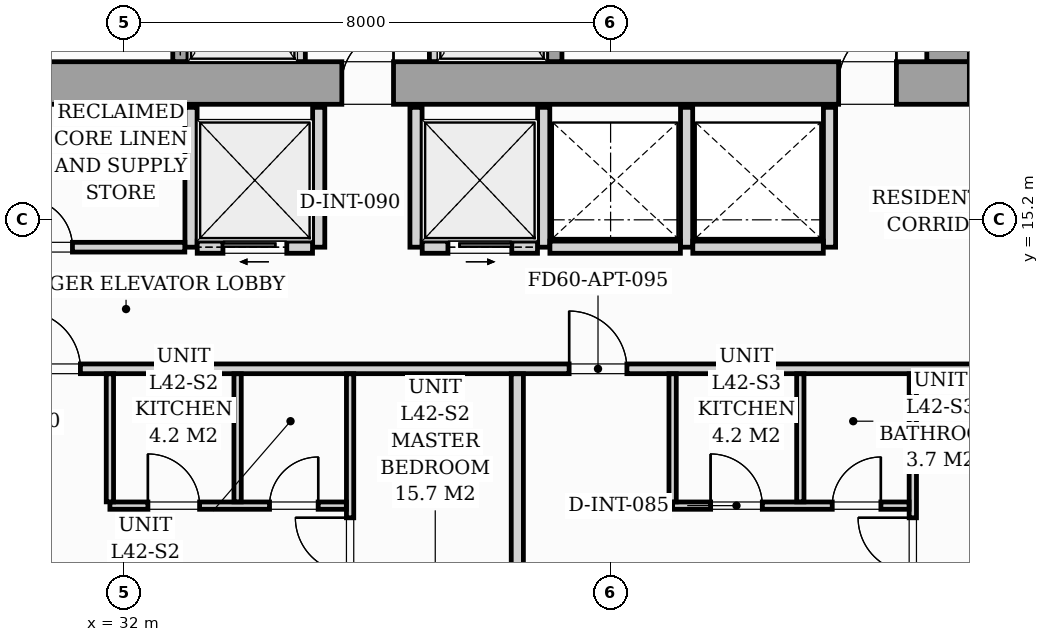
"""IFC4 building model, lengths in metres.
Left out: names, types, materials, properties, quantities, classifications, styles, units other than length and angle.
Written with IfcOpenShell. Run it as: python <this file> out.ifc"""

import sys

from ifc_helpers import new_model, si_unit, direction, frame, frame_2d, origin, origin_2d, place, context, subcontext, project, spatial, rectangle, i_section, extrude, source, transform, mapped, element, fill, save


model = new_model("IFC4")
c1 = context("Model", 3, precision=1e-05, world=origin(), true_north=direction((0.0, 1.0)))
c2 = subcontext(c1, "Body", "Model", "MODEL_VIEW")
j1 = project(units=[si_unit("LENGTHUNIT", "METRE"), si_unit("PLANEANGLEUNIT", "RADIAN")], contexts=[c1])
p1 = place(None, origin())
s1 = spatial("IfcSite", under=j1, at=p1, CompositionType="ELEMENT")
p2 = place(p1, origin())
s2 = spatial("IfcBuilding", under=s1, at=p2, CompositionType="ELEMENT")
p3 = place(p2, frame((0.0, 0.0, 147.0)))
s3 = spatial("IfcBuildingStorey", under=s2, at=p3, CompositionType="ELEMENT", Elevation=147.0)
m1 = source(origin(), c2, "Body", "SweptSolid", [
    extrude(i_section(OverallWidth=0.421, OverallDepth=0.465, WebThickness=0.045, FlangeThickness=0.073, FilletRadius=0.018, at=origin_2d()), origin(), (0.0, 0.0, 1.0), 3.196),
])
for number, where, z_axis, x_axis in (
    (1, (33.12, 17.4, 0.002), (0.0, 0.0, 1.0), (1.0, 0.0, 0.0)),
    (2, (38.88, 17.4, 0.002), (0.0, 0.0, 1.0), (1.0, 0.0, 0.0)),
    (3, (45.6, 17.4, 0.002), (0.0, 0.0, 1.0), (1.0, 0.0, 0.0)),
):
    element("IfcColumn", number, at=place(p3, frame(where, z_axis=z_axis, x_axis=x_axis)), inside=s3, PredefinedType="PILASTER", context=c2, shape_type="MappedRepresentation", body=[
        mapped(m1, transform((0.0, 0.0, 0.0), scale=1.0)),
    ])
p4 = place(p3, frame((26.1, 17.45, 0.0), z_axis=(0.0, 0.0, 1.0), x_axis=(1.0, 0.0, 0.0)))
e4 = element("IfcWall", 4, at=p4, inside=s3, PredefinedType="SHEAR", context=c2, shape_type="SweptSolid", body=[
    extrude(rectangle(XDim=19.8, YDim=0.7, at=frame_2d((9.9, 0.0))), origin(), (0.0, 0.0, 1.0), 3.2),
])
p5 = place(p4, frame((1.05, 0.0, 0.0)))
e5 = element("IfcOpeningElement", 5, at=p5, cuts=e4, PredefinedType="OPENING", context=c2, shape_type="SweptSolid", body=[
    extrude(rectangle(XDim=0.95, YDim=2.06, at=frame_2d((0.475, 1.03))), frame((0.0, 0.36, 0.0), z_axis=(0.0, -1.0, 0.0), x_axis=(1.0, 0.0, 0.0)), (0.0, 0.0, 1.0), 0.72),
])
p6 = place(p4, frame((9.48, 0.0, 0.0)))
e6 = element("IfcOpeningElement", 6, at=p6, cuts=e4, PredefinedType="OPENING", context=c2, shape_type="SweptSolid", body=[
    extrude(rectangle(XDim=0.85, YDim=2.0, at=frame_2d((0.425, 1.0))), frame((0.0, 0.36, 0.0), z_axis=(0.0, -1.0, 0.0), x_axis=(1.0, 0.0, 0.0)), (0.0, 0.0, 1.0), 0.72),
])
p7 = place(p4, frame((17.65, 0.0, 0.0)))
e7 = element("IfcOpeningElement", 7, at=p7, cuts=e4, PredefinedType="OPENING", context=c2, shape_type="SweptSolid", body=[
    extrude(rectangle(XDim=0.95, YDim=2.06, at=frame_2d((0.475, 1.03))), frame((0.0, 0.36, 0.0), z_axis=(0.0, -1.0, 0.0), x_axis=(1.0, 0.0, 0.0)), (0.0, 0.0, 1.0), 0.72),
])
p8 = place(p3, frame((45.55, 17.802, 0.0), z_axis=(0.0, 0.0, 1.0), x_axis=(0.0, 1.0, 0.0)))
e8 = element("IfcWall", 8, at=p8, inside=s3, PredefinedType="SHEAR", context=c2, shape_type="SweptSolid", body=[
    extrude(rectangle(XDim=5.796, YDim=0.7, at=frame_2d((2.898, 0.0))), origin(), (0.0, 0.0, 1.0), 3.2),
])
p9 = place(p3, frame((32.925, 17.802, 0.0), z_axis=(0.0, 0.0, 1.0), x_axis=(0.0, 1.0, 0.0)))
e9 = element("IfcWall", 9, at=p9, inside=s3, PredefinedType="SOLIDWALL", context=c2, shape_type="SweptSolid", body=[
    extrude(rectangle(XDim=2.646, YDim=0.25, at=frame_2d((1.323, 0.0))), origin(), (0.0, 0.0, 1.0), 3.2),
])
p10 = place(p9, frame((0.598, 0.0, 0.0)))
e10 = element("IfcOpeningElement", 10, at=p10, cuts=e9, PredefinedType="OPENING", context=c2, shape_type="SweptSolid", body=[
    extrude(rectangle(XDim=1.1, YDim=2.08, at=frame_2d((0.55, 1.04))), frame((0.0, 0.135, 0.0), z_axis=(0.0, -1.0, 0.0), x_axis=(1.0, 0.0, 0.0)), (0.0, 0.0, 1.0), 0.27),
])
for number, where, z_axis, x_axis in (
    (11, (34.9, 17.802, 0.0), (0.0, 0.0, 1.0), (0.0, 1.0, 0.0)),
    (12, (37.1, 17.802, 0.0), (0.0, 0.0, 1.0), (0.0, 1.0, 0.0)),
):
    element("IfcWall", number, at=place(p3, frame(where, z_axis=z_axis, x_axis=x_axis)), inside=s3, PredefinedType="PARTITIONING", context=c2, shape_type="SweptSolid", body=[
        extrude(rectangle(XDim=2.646, YDim=0.16, at=frame_2d((1.323, 0.0))), origin(), (0.0, 0.0, 1.0), 2.94),
    ])
p11 = place(p3, frame((39.075, 17.802, 0.0), z_axis=(0.0, 0.0, 1.0), x_axis=(0.0, 1.0, 0.0)))
e13 = element("IfcWall", 13, at=p11, inside=s3, PredefinedType="SOLIDWALL", context=c2, shape_type="SweptSolid", body=[
    extrude(rectangle(XDim=2.646, YDim=0.25, at=frame_2d((1.323, 0.0))), origin(), (0.0, 0.0, 1.0), 3.2),
])
p12 = place(p11, frame((0.598, 0.0, 0.0)))
e14 = element("IfcOpeningElement", 14, at=p12, cuts=e13, PredefinedType="OPENING", context=c2, shape_type="SweptSolid", body=[
    extrude(rectangle(XDim=1.1, YDim=2.08, at=frame_2d((0.55, 1.04))), frame((0.0, 0.135, 0.0), z_axis=(0.0, -1.0, 0.0), x_axis=(1.0, 0.0, 0.0)), (0.0, 0.0, 1.0), 0.27),
])
p13 = place(p3, frame((33.1, 14.75, 0.0), z_axis=(0.0, 0.0, 1.0), x_axis=(0.0, 1.0, 0.0)))
e15 = element("IfcWall", 15, at=p13, inside=s3, PredefinedType="PARTITIONING", context=c2, shape_type="SweptSolid", body=[
    extrude(rectangle(XDim=2.3, YDim=0.2, at=frame_2d((1.15, 0.0))), origin(), (0.0, 0.0, 1.0), 2.94),
])
p14 = place(p3, frame((28.482, 14.75, 0.0), z_axis=(0.0, 0.0, 1.0), x_axis=(1.0, 0.0, 0.0)))
e16 = element("IfcWall", 16, at=p14, inside=s3, PredefinedType="PARTITIONING", context=c2, shape_type="SweptSolid", body=[
    extrude(rectangle(XDim=4.516, YDim=0.16, at=frame_2d((2.258, 0.0))), origin(), (0.0, 0.0, 1.0), 2.94),
])
p15 = place(p14, frame((1.868, 0.0, 0.0)))
e17 = element("IfcOpeningElement", 17, at=p15, cuts=e16, PredefinedType="OPENING", context=c2, shape_type="SweptSolid", body=[
    extrude(rectangle(XDim=0.8, YDim=2.05, at=frame_2d((0.4, 1.025))), frame((0.0, 0.09, 0.0), z_axis=(0.0, -1.0, 0.0), x_axis=(1.0, 0.0, 0.0)), (0.0, 0.0, 1.0), 0.18),
])
p16 = place(p3, frame((35.2, 14.75, 0.0), z_axis=(0.0, 0.0, 1.0), x_axis=(0.0, 1.0, 0.0)))
e18 = element("IfcWall", 18, at=p16, inside=s3, PredefinedType="PARTITIONING", context=c2, shape_type="SweptSolid", body=[
    extrude(rectangle(XDim=2.3, YDim=0.2, at=frame_2d((1.15, 0.0))), origin(), (0.0, 0.0, 1.0), 2.94),
])
p17 = place(p3, frame((33.202, 14.75, 0.0), z_axis=(0.0, 0.0, 1.0), x_axis=(1.0, 0.0, 0.0)))
e19 = element("IfcWall", 19, at=p17, inside=s3, PredefinedType="PARTITIONING", context=c2, shape_type="SweptSolid", body=[
    extrude(rectangle(XDim=1.896, YDim=0.2, at=frame_2d((0.948, 0.0))), origin(), (0.0, 0.0, 1.0), 2.94),
])
p18 = place(p17, frame((0.423, 0.0, 0.0)))
e20 = element("IfcOpeningElement", 20, at=p18, cuts=e19, PredefinedType="OPENING", context=c2, shape_type="SweptSolid", body=[
    extrude(rectangle(XDim=1.05, YDim=2.08, at=frame_2d((0.525, 1.04))), frame((0.0, 0.11, 0.0), z_axis=(0.0, -1.0, 0.0), x_axis=(1.0, 0.0, 0.0)), (0.0, 0.0, 1.0), 0.22),
])
for number, where, z_axis, x_axis in (
    (21, (36.8, 14.75, 0.0), (0.0, 0.0, 1.0), (0.0, 1.0, 0.0)),
    (22, (38.9, 14.75, 0.0), (0.0, 0.0, 1.0), (0.0, 1.0, 0.0)),
):
    element("IfcWall", number, at=place(p3, frame(where, z_axis=z_axis, x_axis=x_axis)), inside=s3, PredefinedType="PARTITIONING", context=c2, shape_type="SweptSolid", body=[
        extrude(rectangle(XDim=2.3, YDim=0.2, at=frame_2d((1.15, 0.0))), origin(), (0.0, 0.0, 1.0), 2.94),
    ])
p19 = place(p3, frame((36.902, 14.75, 0.0), z_axis=(0.0, 0.0, 1.0), x_axis=(1.0, 0.0, 0.0)))
e23 = element("IfcWall", 23, at=p19, inside=s3, PredefinedType="PARTITIONING", context=c2, shape_type="SweptSolid", body=[
    extrude(rectangle(XDim=1.896, YDim=0.2, at=frame_2d((0.948, 0.0))), origin(), (0.0, 0.0, 1.0), 2.94),
])
p20 = place(p19, frame((0.423, 0.0, 0.0)))
e24 = element("IfcOpeningElement", 24, at=p20, cuts=e23, PredefinedType="OPENING", context=c2, shape_type="SweptSolid", body=[
    extrude(rectangle(XDim=1.05, YDim=2.08, at=frame_2d((0.525, 1.04))), frame((0.0, 0.11, 0.0), z_axis=(0.0, -1.0, 0.0), x_axis=(1.0, 0.0, 0.0)), (0.0, 0.0, 1.0), 0.22),
])
for number, where, z_axis, x_axis in (
    (25, (41.25, 14.75, 0.0), (0.0, 0.0, 1.0), (0.0, 1.0, 0.0)),
    (26, (43.6, 14.75, 0.0), (0.0, 0.0, 1.0), (0.0, 1.0, 0.0)),
):
    element("IfcWall", number, at=place(p3, frame(where, z_axis=z_axis, x_axis=x_axis)), inside=s3, PredefinedType="PARTITIONING", context=c2, shape_type="SweptSolid", body=[
        extrude(rectangle(XDim=2.3, YDim=0.2, at=frame_2d((1.15, 0.0))), origin(), (0.0, 0.0, 1.0), 2.94),
    ])
for number, where, z_axis, x_axis in (
    (27, (39.002, 14.75, 0.0), (0.0, 0.0, 1.0), (1.0, 0.0, 0.0)),
    (28, (41.352, 14.75, 0.0), (0.0, 0.0, 1.0), (1.0, 0.0, 0.0)),
):
    element("IfcWall", number, at=place(p3, frame(where, z_axis=z_axis, x_axis=x_axis)), inside=s3, PredefinedType="PARTITIONING", context=c2, shape_type="SweptSolid", body=[
        extrude(rectangle(XDim=2.146, YDim=0.2, at=frame_2d((1.073, 0.0))), origin(), (0.0, 0.0, 1.0), 2.94),
    ])
p21 = place(p3, frame((22.05, 12.75, 0.0), z_axis=(0.0, 0.0, 1.0), x_axis=(1.0, 0.0, 0.0)))
e29 = element("IfcWall", 29, at=p21, inside=s3, PredefinedType="PARTITIONING", context=c2, shape_type="SweptSolid", body=[
    extrude(rectangle(XDim=25.65, YDim=0.16, at=frame_2d((12.825, 0.0))), origin(), (0.0, 0.0, 1.0), 2.94),
])
p22 = place(p21, frame((1.312, 0.0, 0.0)))
e30 = element("IfcOpeningElement", 30, at=p22, cuts=e29, PredefinedType="OPENING", context=c2, shape_type="SweptSolid", body=[
    extrude(rectangle(XDim=0.95, YDim=2.06, at=frame_2d((0.475, 1.03))), frame((0.0, 0.09, 0.0), z_axis=(0.0, -1.0, 0.0), x_axis=(1.0, 0.0, 0.0)), (0.0, 0.0, 1.0), 0.18),
])
p23 = place(p21, frame((8.281, 0.0, 0.0)))
e31 = element("IfcOpeningElement", 31, at=p23, cuts=e29, PredefinedType="OPENING", context=c2, shape_type="SweptSolid", body=[
    extrude(rectangle(XDim=0.95, YDim=2.06, at=frame_2d((0.475, 1.03))), frame((0.0, 0.09, 0.0), z_axis=(0.0, -1.0, 0.0), x_axis=(1.0, 0.0, 0.0)), (0.0, 0.0, 1.0), 0.18),
])
p24 = place(p21, frame((17.268, 0.0, 0.0)))
e32 = element("IfcOpeningElement", 32, at=p24, cuts=e29, PredefinedType="OPENING", context=c2, shape_type="SweptSolid", body=[
    extrude(rectangle(XDim=0.95, YDim=2.06, at=frame_2d((0.475, 1.03))), frame((0.0, 0.09, 0.0), z_axis=(0.0, -1.0, 0.0), x_axis=(1.0, 0.0, 0.0)), (0.0, 0.0, 1.0), 0.18),
])
p25 = place(p3, frame((35.716, 6.754, 0.0), z_axis=(0.0, 0.0, 1.0), x_axis=(0.0, 1.0, 0.0)))
e33 = element("IfcWall", 33, at=p25, inside=s3, PredefinedType="PARTITIONING", context=c2, shape_type="SweptSolid", body=[
    extrude(rectangle(XDim=5.914, YDim=0.12, at=frame_2d((2.957, 0.0))), origin(), (0.0, 0.0, 1.0), 2.94),
])
p26 = place(p25, frame((2.646, 0.0, 0.0)))
e34 = element("IfcOpeningElement", 34, at=p26, cuts=e33, PredefinedType="OPENING", context=c2, shape_type="SweptSolid", body=[
    extrude(rectangle(XDim=0.9, YDim=2.05, at=frame_2d((0.45, 1.025))), frame((0.0, 0.07, 0.0), z_axis=(0.0, -1.0, 0.0), x_axis=(1.0, 0.0, 0.0)), (0.0, 0.0, 1.0), 0.14),
])
p27 = place(p3, frame((31.766, 10.5, 0.0), z_axis=(0.0, 0.0, 1.0), x_axis=(1.0, 0.0, 0.0)))
e35 = element("IfcWall", 35, at=p27, inside=s3, PredefinedType="PARTITIONING", context=c2, shape_type="SweptSolid", body=[
    extrude(rectangle(XDim=3.888, YDim=0.12, at=frame_2d((1.944, 0.0))), origin(), (0.0, 0.0, 1.0), 2.94),
])
p28 = place(p27, frame((0.625, 0.0, 0.0)))
e36 = element("IfcOpeningElement", 36, at=p28, cuts=e35, PredefinedType="OPENING", context=c2, shape_type="SweptSolid", body=[
    extrude(rectangle(XDim=0.85, YDim=2.05, at=frame_2d((0.425, 1.025))), frame((0.0, 0.07, 0.0), z_axis=(0.0, -1.0, 0.0), x_axis=(1.0, 0.0, 0.0)), (0.0, 0.0, 1.0), 0.14),
])
p29 = place(p27, frame((2.625, 0.0, 0.0)))
e37 = element("IfcOpeningElement", 37, at=p29, cuts=e35, PredefinedType="OPENING", context=c2, shape_type="SweptSolid", body=[
    extrude(rectangle(XDim=0.8, YDim=2.02, at=frame_2d((0.4, 1.01))), frame((0.0, 0.07, 0.0), z_axis=(0.0, -1.0, 0.0), x_axis=(1.0, 0.0, 0.0)), (0.0, 0.0, 1.0), 0.14),
])
for number, where, z_axis, x_axis in (
    (38, (33.866, 10.562, 0.0), (0.0, 0.0, 1.0), (0.0, 1.0, 0.0)),
    (39, (31.766, 10.562, 0.0), (0.0, 0.0, 1.0), (0.0, 1.0, 0.0)),
):
    element("IfcWall", number, at=place(p3, frame(where, z_axis=z_axis, x_axis=x_axis)), inside=s3, PredefinedType="PARTITIONING", context=c2, shape_type="SweptSolid", body=[
        extrude(rectangle(XDim=2.106, YDim=0.12, at=frame_2d((1.053, 0.0))), origin(), (0.0, 0.0, 1.0), 2.94),
    ])
p30 = place(p3, frame((38.466, 6.49, 0.0), z_axis=(0.0, 0.0, 1.0), x_axis=(0.0, 1.0, 0.0)))
e40 = element("IfcWall", 40, at=p30, inside=s3, PredefinedType="PARTITIONING", context=c2, shape_type="SweptSolid", body=[
    extrude(rectangle(XDim=6.178, YDim=0.2, at=frame_2d((3.089, 0.0))), origin(), (0.0, 0.0, 1.0), 2.94),
])
p31 = place(p3, frame((44.97, 6.046, 0.0), z_axis=(0.0, 0.0, 1.0), x_axis=(0.0, 1.0, 0.0)))
e41 = element("IfcWall", 41, at=p31, inside=s3, PredefinedType="PARTITIONING", context=c2, shape_type="SweptSolid", body=[
    extrude(rectangle(XDim=6.622, YDim=0.12, at=frame_2d((3.311, 0.0))), origin(), (0.0, 0.0, 1.0), 2.94),
])
p32 = place(p31, frame((3.354, 0.0, 0.0)))
e42 = element("IfcOpeningElement", 42, at=p32, cuts=e41, PredefinedType="OPENING", context=c2, shape_type="SweptSolid", body=[
    extrude(rectangle(XDim=0.9, YDim=2.05, at=frame_2d((0.45, 1.025))), frame((0.0, 0.07, 0.0), z_axis=(0.0, -1.0, 0.0), x_axis=(1.0, 0.0, 0.0)), (0.0, 0.0, 1.0), 0.14),
])
p33 = place(p3, frame((41.02, 10.5, 0.0), z_axis=(0.0, 0.0, 1.0), x_axis=(1.0, 0.0, 0.0)))
e43 = element("IfcWall", 43, at=p33, inside=s3, PredefinedType="PARTITIONING", context=c2, shape_type="SweptSolid", body=[
    extrude(rectangle(XDim=3.888, YDim=0.12, at=frame_2d((1.944, 0.0))), origin(), (0.0, 0.0, 1.0), 2.94),
])
p34 = place(p33, frame((0.625, 0.0, 0.0)))
e44 = element("IfcOpeningElement", 44, at=p34, cuts=e43, PredefinedType="OPENING", context=c2, shape_type="SweptSolid", body=[
    extrude(rectangle(XDim=0.85, YDim=2.05, at=frame_2d((0.425, 1.025))), frame((0.0, 0.07, 0.0), z_axis=(0.0, -1.0, 0.0), x_axis=(1.0, 0.0, 0.0)), (0.0, 0.0, 1.0), 0.14),
])
p35 = place(p33, frame((2.625, 0.0, 0.0)))
e45 = element("IfcOpeningElement", 45, at=p35, cuts=e43, PredefinedType="OPENING", context=c2, shape_type="SweptSolid", body=[
    extrude(rectangle(XDim=0.8, YDim=2.02, at=frame_2d((0.4, 1.01))), frame((0.0, 0.07, 0.0), z_axis=(0.0, -1.0, 0.0), x_axis=(1.0, 0.0, 0.0)), (0.0, 0.0, 1.0), 0.14),
])
for number, where, z_axis, x_axis in (
    (46, (43.12, 10.562, 0.0), (0.0, 0.0, 1.0), (0.0, 1.0, 0.0)),
    (47, (41.02, 10.562, 0.0), (0.0, 0.0, 1.0), (0.0, 1.0, 0.0)),
):
    element("IfcWall", number, at=place(p3, frame(where, z_axis=z_axis, x_axis=x_axis)), inside=s3, PredefinedType="PARTITIONING", context=c2, shape_type="SweptSolid", body=[
        extrude(rectangle(XDim=2.106, YDim=0.12, at=frame_2d((1.053, 0.0))), origin(), (0.0, 0.0, 1.0), 2.94),
    ])
m2 = source(origin(), c2, "Body", "SweptSolid", [
    extrude(rectangle(XDim=0.85, YDim=2.0, at=frame_2d((0.425, 1.0))), frame((0.0, 0.025, 0.0), z_axis=(0.0, -1.0, 0.0), x_axis=(1.0, 0.0, 0.0)), (0.0, 0.0, 1.0), 0.05),
])
p36 = place(p6, origin())
e48 = element("IfcDoor", 48, at=p36, inside=s3, OperationType="SINGLE_SWING_RIGHT", PredefinedType="DOOR", context=c2, shape_type="MappedRepresentation", body=[
    mapped(m2, transform((0.0, 0.0, 0.0), scale=1.0)),
])
fill(e6, e48)
m3 = source(origin(), c2, "Body", "SweptSolid", [
    extrude(rectangle(XDim=0.95, YDim=2.06, at=frame_2d((0.475, 1.03))), frame((0.0, 0.025, 0.0), z_axis=(0.0, -1.0, 0.0), x_axis=(1.0, 0.0, 0.0)), (0.0, 0.0, 1.0), 0.05),
])
p37 = place(p7, origin())
e49 = element("IfcDoor", 49, at=p37, inside=s3, OperationType="SINGLE_SWING_RIGHT", PredefinedType="DOOR", context=c2, shape_type="MappedRepresentation", body=[
    mapped(m3, transform((0.0, 0.0, 0.0), scale=1.0)),
])
fill(e7, e49)
m4 = source(origin(), c2, "Body", "SweptSolid", [
    extrude(rectangle(XDim=0.8, YDim=2.05, at=frame_2d((0.4, 1.025))), frame((0.0, 0.025, 0.0), z_axis=(0.0, -1.0, 0.0), x_axis=(1.0, 0.0, 0.0)), (0.0, 0.0, 1.0), 0.05),
])
p38 = place(p15, origin())
e50 = element("IfcDoor", 50, at=p38, inside=s3, OperationType="SINGLE_SWING_LEFT", PredefinedType="DOOR", context=c2, shape_type="MappedRepresentation", body=[
    mapped(m4, transform((0.0, 0.0, 0.0), scale=1.0)),
])
fill(e17, e50)
m5 = source(origin(), c2, "Body", "SweptSolid", [
    extrude(rectangle(XDim=1.05, YDim=2.08, at=frame_2d((0.525, 1.04))), frame((0.0, 0.025, 0.0), z_axis=(0.0, -1.0, 0.0), x_axis=(1.0, 0.0, 0.0)), (0.0, 0.0, 1.0), 0.05),
])
p39 = place(p18, origin())
e51 = element("IfcDoor", 51, at=p39, inside=s3, OperationType="SLIDING_TO_LEFT", PredefinedType="DOOR", context=c2, shape_type="MappedRepresentation", body=[
    mapped(m5, transform((0.0, 0.0, 0.0), scale=1.0)),
])
fill(e20, e51)
p40 = place(p20, origin())
e52 = element("IfcDoor", 52, at=p40, inside=s3, OperationType="SLIDING_TO_RIGHT", PredefinedType="DOOR", context=c2, shape_type="MappedRepresentation", body=[
    mapped(m5, transform((0.0, 0.0, 0.0), scale=1.0)),
])
fill(e24, e52)
m6 = source(origin(), c2, "Body", "SweptSolid", [
    extrude(rectangle(XDim=0.95, YDim=2.06, at=frame_2d((0.475, 1.03))), frame((0.0, 0.025, 0.0), z_axis=(0.0, -1.0, 0.0), x_axis=(1.0, 0.0, 0.0)), (0.0, 0.0, 1.0), 0.05),
])
p41 = place(p23, origin())
e53 = element("IfcDoor", 53, at=p41, inside=s3, OperationType="SINGLE_SWING_LEFT", PredefinedType="DOOR", context=c2, shape_type="MappedRepresentation", body=[
    mapped(m6, transform((0.0, 0.0, 0.0), scale=1.0)),
])
fill(e31, e53)
m7 = source(origin(), c2, "Body", "SweptSolid", [
    extrude(rectangle(XDim=0.9, YDim=2.05, at=frame_2d((0.45, 1.025))), frame((0.0, 0.025, 0.0), z_axis=(0.0, -1.0, 0.0), x_axis=(1.0, 0.0, 0.0)), (0.0, 0.0, 1.0), 0.05),
])
p42 = place(p26, origin())
e54 = element("IfcDoor", 54, at=p42, inside=s3, OperationType="SINGLE_SWING_RIGHT", PredefinedType="DOOR", context=c2, shape_type="MappedRepresentation", body=[
    mapped(m7, transform((0.0, 0.0, 0.0), scale=1.0)),
])
fill(e34, e54)
m8 = source(origin(), c2, "Body", "SweptSolid", [
    extrude(rectangle(XDim=0.85, YDim=2.05, at=frame_2d((0.425, 1.025))), frame((0.0, 0.025, 0.0), z_axis=(0.0, -1.0, 0.0), x_axis=(1.0, 0.0, 0.0)), (0.0, 0.0, 1.0), 0.05),
])
p43 = place(p28, origin())
e55 = element("IfcDoor", 55, at=p43, inside=s3, OperationType="SINGLE_SWING_LEFT", PredefinedType="DOOR", context=c2, shape_type="MappedRepresentation", body=[
    mapped(m8, transform((0.0, 0.0, 0.0), scale=1.0)),
])
fill(e36, e55)
m9 = source(origin(), c2, "Body", "SweptSolid", [
    extrude(rectangle(XDim=0.8, YDim=2.02, at=frame_2d((0.4, 1.01))), frame((0.0, 0.025, 0.0), z_axis=(0.0, -1.0, 0.0), x_axis=(1.0, 0.0, 0.0)), (0.0, 0.0, 1.0), 0.05),
])
p44 = place(p29, origin())
e56 = element("IfcDoor", 56, at=p44, inside=s3, OperationType="SINGLE_SWING_RIGHT", PredefinedType="DOOR", context=c2, shape_type="MappedRepresentation", body=[
    mapped(m9, transform((0.0, 0.0, 0.0), scale=1.0)),
])
fill(e37, e56)
p45 = place(p24, origin())
e57 = element("IfcDoor", 57, at=p45, inside=s3, OperationType="SINGLE_SWING_LEFT", PredefinedType="DOOR", context=c2, shape_type="MappedRepresentation", body=[
    mapped(m6, transform((0.0, 0.0, 0.0), scale=1.0)),
])
fill(e32, e57)
p46 = place(p32, origin())
e58 = element("IfcDoor", 58, at=p46, inside=s3, OperationType="SINGLE_SWING_RIGHT", PredefinedType="DOOR", context=c2, shape_type="MappedRepresentation", body=[
    mapped(m7, transform((0.0, 0.0, 0.0), scale=1.0)),
])
fill(e42, e58)
p47 = place(p34, origin())
e59 = element("IfcDoor", 59, at=p47, inside=s3, OperationType="SINGLE_SWING_LEFT", PredefinedType="DOOR", context=c2, shape_type="MappedRepresentation", body=[
    mapped(m8, transform((0.0, 0.0, 0.0), scale=1.0)),
])
fill(e44, e59)
p48 = place(p35, origin())
e60 = element("IfcDoor", 60, at=p48, inside=s3, OperationType="SINGLE_SWING_RIGHT", PredefinedType="DOOR", context=c2, shape_type="MappedRepresentation", body=[
    mapped(m9, transform((0.0, 0.0, 0.0), scale=1.0)),
])
fill(e45, e60)
save(model, sys.argv[1])
